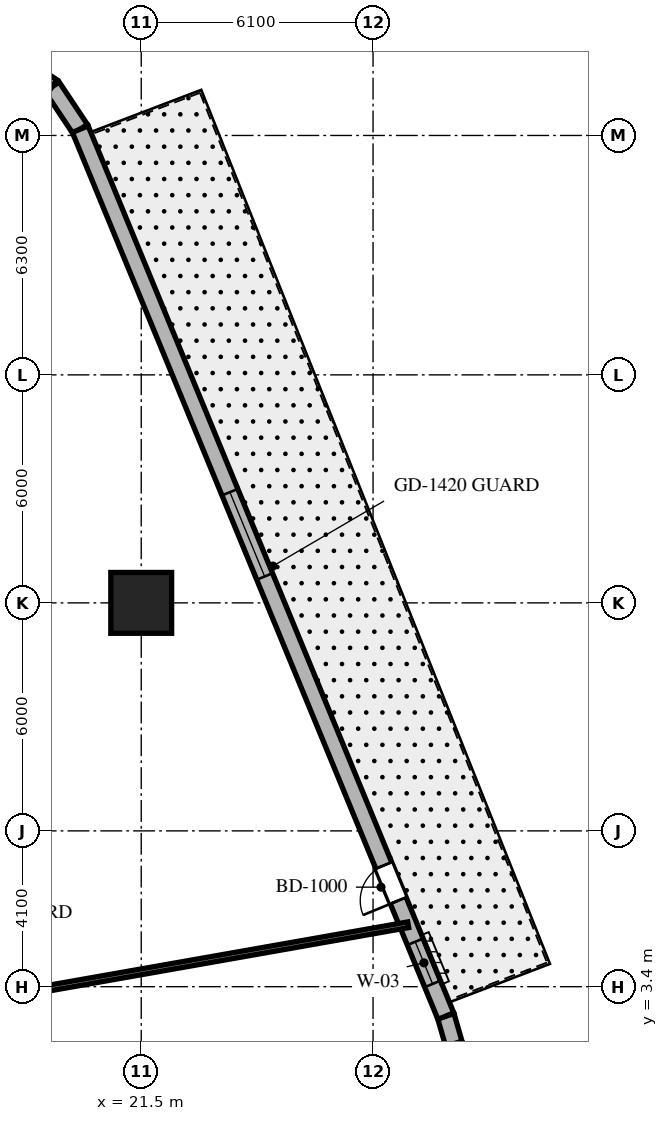
"""IFC4 building model, lengths in metres.
Left out: names, types, materials, properties, quantities, classifications, styles, units other than length and angle.
Written with IfcOpenShell. Run it as: python <this file> out.ifc"""

import sys

from ifc_helpers import new_model, si_unit, direction, frame, frame_2d, origin, origin_2d, place, context, subcontext, project, spatial, rectangle, extrude, element, fill, save


model = new_model("IFC4")
c1 = context("Model", 3, precision=1e-05, world=origin(), true_north=direction((0.0, 1.0)))
c2 = subcontext(c1, "Body", "Model", "MODEL_VIEW")
j1 = project(units=[si_unit("LENGTHUNIT", "METRE"), si_unit("PLANEANGLEUNIT", "RADIAN")], contexts=[c1])
p1 = place(None, origin())
s1 = spatial("IfcSite", under=j1, at=p1, CompositionType="ELEMENT")
p2 = place(p1, origin())
s2 = spatial("IfcBuilding", under=s1, at=p2, CompositionType="ELEMENT")
p3 = place(p2, frame((0.0, 0.0, 11.4)))
s3 = spatial("IfcBuildingStorey", under=s2, at=p3, CompositionType="ELEMENT", Elevation=11.4)
p4 = place(p3, frame((21.5, 13.5, 0.0), z_axis=(0.0, 0.0, 1.0), x_axis=(1.0, 0.0, 0.0)))
e1 = element("IfcColumn", 1, at=p4, inside=s3, PredefinedType="COLUMN", context=c2, shape_type="SweptSolid", body=[
    extrude(rectangle(XDim=1.6, YDim=1.6, at=origin_2d()), origin(), (0.0, 0.0, 1.0), 7.2),
])
p5 = place(p3, frame((29.725, 1.9, 0.0), z_axis=(0.0, 0.0, 1.0), x_axis=(-0.276810835942, 0.960924430486, 0.0)))
e2 = element("IfcWall", 2, at=p5, inside=s3, PredefinedType="SOLIDWALL", context=c2, shape_type="SweptSolid", body=[
    extrude(rectangle(XDim=0.756, YDim=0.45, at=frame_2d((0.378, 0.0))), origin(), (0.0, 0.0, 1.0), 6.88),
])
p6 = place(p3, frame((19.896, 25.966, 0.0), z_axis=(0.0, 0.0, 1.0), x_axis=(-0.554237463162, 0.832358597257, 0.0)))
e3 = element("IfcWall", 3, at=p6, inside=s3, PredefinedType="SOLIDWALL", context=c2, shape_type="SweptSolid", body=[
    extrude(rectangle(XDim=1.34, YDim=0.45, at=frame_2d((0.67, 0.0))), origin(), (0.0, 0.0, 1.0), 6.88),
])
p7 = place(p3, frame((19.153, 27.081, 0.0), z_axis=(0.0, 0.0, 1.0), x_axis=(-0.831050979436, 0.556196250956, 0.0)))
e4 = element("IfcWall", 4, at=p7, inside=s3, PredefinedType="SOLIDWALL", context=c2, shape_type="SweptSolid", body=[
    extrude(rectangle(XDim=1.317, YDim=0.45, at=frame_2d((0.659, 0.0))), origin(), (0.0, 0.0, 1.0), 6.88),
])
p8 = place(p3, frame((29.516, 2.627, 0.0), z_axis=(0.0, 0.0, 1.0), x_axis=(-0.381080066032, 0.924542039754, 0.0)))
e5 = element("IfcWall", 5, at=p8, inside=s3, PredefinedType="SOLIDWALL", context=c2, shape_type="SweptSolid", body=[
    extrude(rectangle(XDim=25.244, YDim=0.45, at=frame_2d((12.622, 0.0))), origin(), (0.0, 0.0, 1.0), 6.88),
])
p9 = place(p8, frame((3.287, 0.0, 0.0)))
e6 = element("IfcOpeningElement", 6, at=p9, cuts=e5, PredefinedType="OPENING", context=c2, shape_type="SweptSolid", body=[
    extrude(rectangle(XDim=1.0, YDim=2.15, at=frame_2d((0.5, 1.075))), frame((0.0, 0.235, 0.0), z_axis=(0.0, -1.0, 0.0), x_axis=(1.0, 0.0, 0.0)), (0.0, 0.0, 1.0), 0.47),
])
p10 = place(p8, frame((0.915, 0.0, 0.85)))
e7 = element("IfcOpeningElement", 7, at=p10, cuts=e5, PredefinedType="OPENING", context=c2, shape_type="SweptSolid", body=[
    extrude(rectangle(XDim=1.2, YDim=1.8, at=frame_2d((0.6, 0.9))), frame((0.0, 0.235, 0.0), z_axis=(0.0, -1.0, 0.0), x_axis=(1.0, 0.0, 0.0)), (0.0, 0.0, 1.0), 0.47),
])
p11 = place(p8, frame((12.512, 0.0, 0.85)))
e8 = element("IfcOpeningElement", 8, at=p11, cuts=e5, PredefinedType="OPENING", context=c2, shape_type="SweptSolid", body=[
    extrude(rectangle(XDim=2.4, YDim=2.4, at=frame_2d((1.2, 1.2))), frame((0.0, 0.235, 0.0), z_axis=(0.0, -1.0, 0.0), x_axis=(1.0, 0.0, 0.0)), (0.0, 0.0, 1.0), 0.47),
])
p12 = place(p3, frame((15.3, 2.698, 0.0), z_axis=(0.0, 0.0, 1.0), x_axis=(0.984806610591, 0.173654656533, 0.0)))
e9 = element("IfcWall", 9, at=p12, inside=s3, PredefinedType="PARTITIONING", context=c2, shape_type="SweptSolid", body=[
    extrude(rectangle(XDim=13.429, YDim=0.15, at=frame_2d((6.715, 0.0))), origin(), (0.0, 0.0, 1.0), 6.014),
])
p13 = place(p9, origin())
e10 = element("IfcDoor", 10, at=p13, inside=s3, OperationType="SINGLE_SWING_LEFT", PredefinedType="DOOR", context=c2, shape_type="SweptSolid", body=[
    extrude(rectangle(XDim=1.0, YDim=2.15, at=frame_2d((0.5, 1.075))), frame((0.0, 0.025, 0.0), z_axis=(0.0, -1.0, 0.0), x_axis=(1.0, 0.0, 0.0)), (0.0, 0.0, 1.0), 0.05),
])
fill(e6, e10)
p14 = place(p10, origin())
e11 = element("IfcWindow", 11, at=p14, inside=s3, PartitioningType="SINGLE_PANEL", PredefinedType="WINDOW", context=c2, shape_type="SweptSolid", body=[
    extrude(rectangle(XDim=1.2, YDim=1.8, at=frame_2d((0.6, 0.9))), frame((0.0, 0.03, 0.0), z_axis=(0.0, -1.0, 0.0), x_axis=(1.0, 0.0, 0.0)), (0.0, 0.0, 1.0), 0.06),
])
fill(e7, e11)
p15 = place(p11, origin())
e12 = element("IfcWindow", 12, at=p15, inside=s3, PartitioningType="SINGLE_PANEL", PredefinedType="WINDOW", context=c2, shape_type="SweptSolid", body=[
    extrude(rectangle(XDim=2.4, YDim=2.4, at=frame_2d((1.2, 1.2))), frame((0.0, 0.03, 0.0), z_axis=(0.0, -1.0, 0.0), x_axis=(1.0, 0.0, 0.0)), (0.0, 0.0, 1.0), 0.06),
])
fill(e8, e12)
save(model, sys.argv[1])
